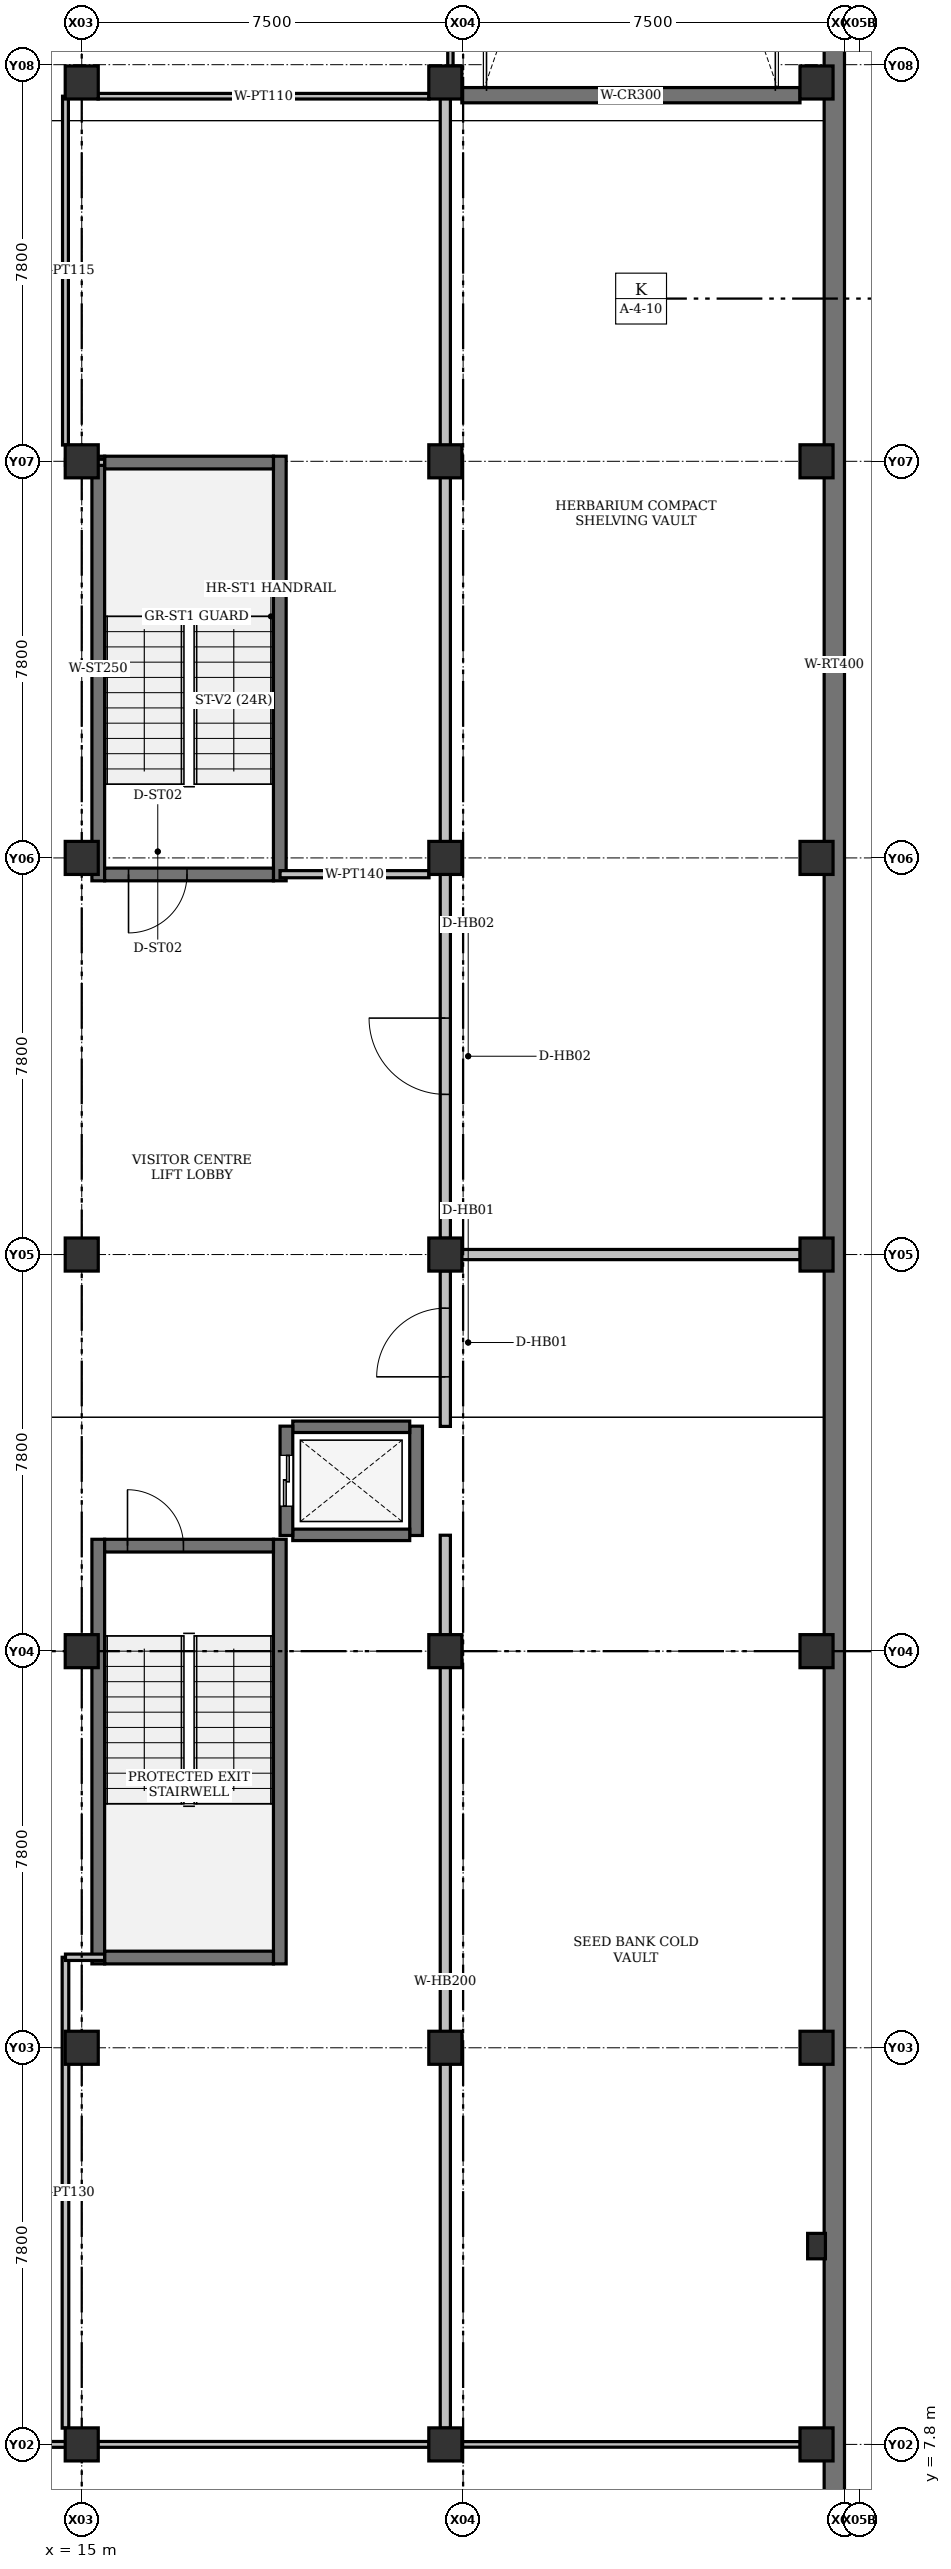
"""IFC4 building model, lengths in metres.
Left out: names, types, materials, properties, quantities, classifications, styles, units other than length and angle.
Written with IfcOpenShell. Run it as: python <this file> out.ifc"""

import sys

from ifc_helpers import new_model, si_unit, direction, frame, frame_2d, origin, origin_2d, place, context, subcontext, project, spatial, rectangle, extrude, element, fill, save


model = new_model("IFC4")
c1 = context("Model", 3, precision=1e-05, world=origin(), true_north=direction((0.0, 1.0)))
c2 = subcontext(c1, "Body", "Model", "MODEL_VIEW")
j1 = project(units=[si_unit("LENGTHUNIT", "METRE"), si_unit("PLANEANGLEUNIT", "RADIAN")], contexts=[c1])
p1 = place(None, origin())
s1 = spatial("IfcSite", under=j1, at=p1, CompositionType="ELEMENT")
p2 = place(p1, origin())
s2 = spatial("IfcBuilding", under=s1, at=p2, CompositionType="ELEMENT")
p3 = place(p2, frame((0.0, 0.0, -8.4)))
s3 = spatial("IfcBuildingStorey", under=s2, at=p3, CompositionType="ELEMENT", Elevation=-8.4)
for number, where, z_axis, x_axis in (
    (1, (15.0, 7.8, -0.3), (0.0, 0.0, 1.0), (1.0, 0.0, 0.0)),
    (2, (15.0, 15.6, -0.3), (0.0, 0.0, 1.0), (1.0, 0.0, 0.0)),
    (3, (15.0, 23.4, -0.3), (0.0, 0.0, 1.0), (1.0, 0.0, 0.0)),
    (4, (15.0, 31.2, -0.3), (0.0, 0.0, 1.0), (1.0, 0.0, 0.0)),
    (5, (15.0, 39.0, -0.3), (0.0, 0.0, 1.0), (1.0, 0.0, 0.0)),
    (6, (15.0, 46.8, -0.3), (0.0, 0.0, 1.0), (1.0, 0.0, 0.0)),
    (7, (15.0, 54.25, -0.3), (0.0, 0.0, 1.0), (1.0, 0.0, 0.0)),
    (8, (22.15, 7.8, -0.3), (0.0, 0.0, 1.0), (1.0, 0.0, 0.0)),
    (9, (22.15, 15.6, -0.3), (0.0, 0.0, 1.0), (1.0, 0.0, 0.0)),
    (10, (22.15, 23.4, -0.3), (0.0, 0.0, 1.0), (1.0, 0.0, 0.0)),
    (11, (22.15, 31.2, -0.3), (0.0, 0.0, 1.0), (1.0, 0.0, 0.0)),
    (12, (22.15, 39.0, -0.3), (0.0, 0.0, 1.0), (1.0, 0.0, 0.0)),
    (13, (22.15, 46.8, -0.3), (0.0, 0.0, 1.0), (1.0, 0.0, 0.0)),
    (14, (22.15, 54.25, -0.3), (0.0, 0.0, 1.0), (1.0, 0.0, 0.0)),
    (15, (29.45, 7.8, -0.3), (0.0, 0.0, 1.0), (1.0, 0.0, 0.0)),
    (16, (29.45, 15.6, -0.3), (0.0, 0.0, 1.0), (1.0, 0.0, 0.0)),
    (17, (29.45, 23.4, -0.3), (0.0, 0.0, 1.0), (1.0, 0.0, 0.0)),
    (18, (29.45, 31.2, -0.3), (0.0, 0.0, 1.0), (1.0, 0.0, 0.0)),
    (19, (29.45, 39.0, -0.3), (0.0, 0.0, 1.0), (1.0, 0.0, 0.0)),
    (20, (29.45, 46.8, -0.3), (0.0, 0.0, 1.0), (1.0, 0.0, 0.0)),
    (21, (29.45, 54.25, -0.3), (0.0, 0.0, 1.0), (1.0, 0.0, 0.0)),
):
    element("IfcColumn", number, at=place(p3, frame(where, z_axis=z_axis, x_axis=x_axis)), inside=s3, PredefinedType="COLUMN", context=c2, shape_type="SweptSolid", body=[
        extrude(rectangle(XDim=0.65, YDim=0.65, at=origin_2d()), origin(), (0.0, 0.0, 1.0), 4.5),
    ])
p4 = place(p3, frame((29.45, 11.7, -0.3), z_axis=(0.0, 0.0, 1.0), x_axis=(1.0, 0.0, 0.0)))
e22 = element("IfcColumn", 22, at=p4, inside=s3, PredefinedType="PILASTER", context=c2, shape_type="SweptSolid", body=[
    extrude(rectangle(XDim=0.35, YDim=0.5, at=origin_2d()), origin(), (0.0, 0.0, 1.0), 4.5),
])
p5 = place(p3, frame((29.8, 85.2, -0.3), z_axis=(0.0, 0.0, 1.0), x_axis=(0.0, -1.0, 0.0)))
e23 = element("IfcWall", 23, at=p5, inside=s3, PredefinedType="USERDEFINED", context=c2, shape_type="SweptSolid", body=[
    extrude(rectangle(XDim=84.8, YDim=0.4, at=frame_2d((42.4, 0.0))), origin(), (0.0, 0.0, 1.0), 4.26),
])
for number, where, z_axis, x_axis in (
    (24, (15.325, 17.25, -0.3), (0.0, 0.0, 1.0), (0.0, 1.0, 0.0)),
    (25, (18.895, 17.25, -0.3), (0.0, 0.0, 1.0), (0.0, 1.0, 0.0)),
):
    element("IfcWall", number, at=place(p3, frame(where, z_axis=z_axis, x_axis=x_axis)), inside=s3, PredefinedType="SHEAR", context=c2, shape_type="SweptSolid", body=[
        extrude(rectangle(XDim=8.35, YDim=0.25, at=frame_2d((4.175, 0.0))), origin(), (0.0, 0.0, 1.0), 4.5),
    ])
p6 = place(p3, frame((15.45, 17.375, -0.3), z_axis=(0.0, 0.0, 1.0), x_axis=(1.0, 0.0, 0.0)))
e26 = element("IfcWall", 26, at=p6, inside=s3, PredefinedType="SHEAR", context=c2, shape_type="SweptSolid", body=[
    extrude(rectangle(XDim=3.32, YDim=0.25, at=frame_2d((1.66, 0.0))), origin(), (0.0, 0.0, 1.0), 4.5),
])
p7 = place(p3, frame((15.45, 25.475, -0.3), z_axis=(0.0, 0.0, 1.0), x_axis=(1.0, 0.0, 0.0)))
e27 = element("IfcWall", 27, at=p7, inside=s3, PredefinedType="SHEAR", context=c2, shape_type="SweptSolid", body=[
    extrude(rectangle(XDim=3.32, YDim=0.25, at=frame_2d((1.66, 0.0))), origin(), (0.0, 0.0, 1.0), 4.5),
])
p8 = place(p7, frame((0.45, 0.0, 0.3)))
e28 = element("IfcOpeningElement", 28, at=p8, cuts=e27, PredefinedType="OPENING", context=c2, shape_type="SweptSolid", body=[
    extrude(rectangle(XDim=1.1, YDim=2.15, at=frame_2d((0.55, 1.075))), frame((0.0, 0.125, 0.0), z_axis=(0.0, -1.0, 0.0), x_axis=(1.0, 0.0, 0.0)), (0.0, 0.0, 1.0), 0.25),
])
for number, where, z_axis, x_axis in (
    (29, (15.325, 38.55, -0.3), (0.0, 0.0, 1.0), (0.0, 1.0, 0.0)),
    (30, (18.895, 38.55, -0.3), (0.0, 0.0, 1.0), (0.0, 1.0, 0.0)),
):
    element("IfcWall", number, at=place(p3, frame(where, z_axis=z_axis, x_axis=x_axis)), inside=s3, PredefinedType="SHEAR", context=c2, shape_type="SweptSolid", body=[
        extrude(rectangle(XDim=8.35, YDim=0.25, at=frame_2d((4.175, 0.0))), origin(), (0.0, 0.0, 1.0), 4.5),
    ])
p9 = place(p3, frame((15.45, 46.775, -0.3), z_axis=(0.0, 0.0, 1.0), x_axis=(1.0, 0.0, 0.0)))
e31 = element("IfcWall", 31, at=p9, inside=s3, PredefinedType="SHEAR", context=c2, shape_type="SweptSolid", body=[
    extrude(rectangle(XDim=3.32, YDim=0.25, at=frame_2d((1.66, 0.0))), origin(), (0.0, 0.0, 1.0), 4.5),
])
p10 = place(p3, frame((18.77, 38.675, -0.3), z_axis=(0.0, 0.0, 1.0), x_axis=(-1.0, 0.0, 0.0)))
e32 = element("IfcWall", 32, at=p10, inside=s3, PredefinedType="SHEAR", context=c2, shape_type="SweptSolid", body=[
    extrude(rectangle(XDim=3.32, YDim=0.25, at=frame_2d((1.66, 0.0))), origin(), (0.0, 0.0, 1.0), 4.5),
])
p11 = place(p10, frame((1.7, 0.0, 0.3)))
e33 = element("IfcOpeningElement", 33, at=p11, cuts=e32, PredefinedType="OPENING", context=c2, shape_type="SweptSolid", body=[
    extrude(rectangle(XDim=1.15, YDim=2.15, at=frame_2d((0.575, 1.075))), frame((0.0, 0.125, 0.0), z_axis=(0.0, -1.0, 0.0), x_axis=(1.0, 0.0, 0.0)), (0.0, 0.0, 1.0), 0.25),
])
p12 = place(p3, frame((21.575, 25.675, -0.3), z_axis=(0.0, 0.0, 1.0), x_axis=(0.0, 1.0, 0.0)))
e34 = element("IfcWall", 34, at=p12, inside=s3, PredefinedType="SHEAR", context=c2, shape_type="SweptSolid", body=[
    extrude(rectangle(XDim=2.15, YDim=0.25, at=frame_2d((1.075, 0.0))), origin(), (0.0, 0.0, 1.0), 4.5),
])
for number, where, z_axis, x_axis in (
    (35, (19.15, 25.688, -0.3), (0.0, 0.0, 1.0), (1.0, 0.0, 0.0)),
    (36, (19.15, 27.812, -0.3), (0.0, 0.0, 1.0), (1.0, 0.0, 0.0)),
):
    element("IfcWall", number, at=place(p3, frame(where, z_axis=z_axis, x_axis=x_axis)), inside=s3, PredefinedType="SHEAR", context=c2, shape_type="SweptSolid", body=[
        extrude(rectangle(XDim=2.3, YDim=0.225, at=frame_2d((1.15, 0.0))), origin(), (0.0, 0.0, 1.0), 4.5),
    ])
p13 = place(p3, frame((19.025, 25.675, -0.3), z_axis=(0.0, 0.0, 1.0), x_axis=(0.0, 1.0, 0.0)))
e37 = element("IfcWall", 37, at=p13, inside=s3, PredefinedType="SHEAR", context=c2, shape_type="SweptSolid", body=[
    extrude(rectangle(XDim=2.15, YDim=0.25, at=frame_2d((1.075, 0.0))), origin(), (0.0, 0.0, 1.0), 4.5),
])
p14 = place(p13, frame((0.575, 0.0, 0.3)))
e38 = element("IfcOpeningElement", 38, at=p14, cuts=e37, PredefinedType="OPENING", context=c2, shape_type="SweptSolid", body=[
    extrude(rectangle(XDim=1.0, YDim=2.1, at=frame_2d((0.5, 1.05))), frame((0.0, 0.125, 0.0), z_axis=(0.0, -1.0, 0.0), x_axis=(1.0, 0.0, 0.0)), (0.0, 0.0, 1.0), 0.25),
])
p15 = place(p3, frame((22.475, 54.0, -0.3), z_axis=(0.0, 0.0, 1.0), x_axis=(1.0, 0.0, 0.0)))
e39 = element("IfcWall", 39, at=p15, inside=s3, PredefinedType="SHEAR", context=c2, shape_type="SweptSolid", body=[
    extrude(rectangle(XDim=6.65, YDim=0.3, at=frame_2d((3.325, 0.0))), origin(), (0.0, 0.0, 1.0), 0.3),
])
p16 = place(p3, frame((22.15, 8.12, 0.0), z_axis=(0.0, 0.0, 1.0), x_axis=(0.0, 1.0, 0.0)))
e40 = element("IfcWall", 40, at=p16, inside=s3, PredefinedType="SOLIDWALL", context=c2, shape_type="SweptSolid", body=[
    extrude(rectangle(XDim=17.56, YDim=0.2, at=frame_2d((8.78, 0.0))), origin(), (0.0, 0.0, 1.0), 3.487),
])
p17 = place(p3, frame((22.15, 27.82, 0.0), z_axis=(0.0, 0.0, 1.0), x_axis=(0.0, 1.0, 0.0)))
e41 = element("IfcWall", 41, at=p17, inside=s3, PredefinedType="SOLIDWALL", context=c2, shape_type="SweptSolid", body=[
    extrude(rectangle(XDim=3.06, YDim=0.2, at=frame_2d((1.53, 0.0))), origin(), (0.0, 0.0, 1.0), 3.487),
])
p18 = place(p17, frame((0.975, 0.0, 0.0)))
e42 = element("IfcOpeningElement", 42, at=p18, cuts=e41, PredefinedType="OPENING", context=c2, shape_type="SweptSolid", body=[
    extrude(rectangle(XDim=1.35, YDim=2.25, at=frame_2d((0.675, 1.125))), frame((0.0, 0.1, 0.0), z_axis=(0.0, -1.0, 0.0), x_axis=(1.0, 0.0, 0.0)), (0.0, 0.0, 1.0), 0.2),
])
p19 = place(p3, frame((22.15, 31.52, 0.0), z_axis=(0.0, 0.0, 1.0), x_axis=(0.0, 1.0, 0.0)))
e43 = element("IfcWall", 43, at=p19, inside=s3, PredefinedType="SOLIDWALL", context=c2, shape_type="SweptSolid", body=[
    extrude(rectangle(XDim=7.16, YDim=0.2, at=frame_2d((3.58, 0.0))), origin(), (0.0, 0.0, 1.0), 3.487),
])
p20 = place(p19, frame((2.83, 0.0, 0.0)))
e44 = element("IfcOpeningElement", 44, at=p20, cuts=e43, PredefinedType="OPENING", context=c2, shape_type="SweptSolid", body=[
    extrude(rectangle(XDim=1.5, YDim=2.3, at=frame_2d((0.75, 1.15))), frame((0.0, 0.1, 0.0), z_axis=(0.0, -1.0, 0.0), x_axis=(1.0, 0.0, 0.0)), (0.0, 0.0, 1.0), 0.2),
])
p21 = place(p3, frame((22.15, 39.32, 0.0), z_axis=(0.0, 0.0, 1.0), x_axis=(0.0, 1.0, 0.0)))
e45 = element("IfcWall", 45, at=p21, inside=s3, PredefinedType="SOLIDWALL", context=c2, shape_type="SweptSolid", body=[
    extrude(rectangle(XDim=14.63, YDim=0.2, at=frame_2d((7.315, 0.0))), origin(), (0.0, 0.0, 1.0), 3.487),
])
p22 = place(p3, frame((29.13, 31.2, 0.0), z_axis=(0.0, 0.0, 1.0), x_axis=(-1.0, 0.0, 0.0)))
e46 = element("IfcWall", 46, at=p22, inside=s3, PredefinedType="SOLIDWALL", context=c2, shape_type="SweptSolid", body=[
    extrude(rectangle(XDim=6.66, YDim=0.2, at=frame_2d((3.33, 0.0))), origin(), (0.0, 0.0, 1.0), 3.411),
])
p23 = place(p3, frame((18.9, 38.68, 0.0), z_axis=(0.0, 0.0, 1.0), x_axis=(1.0, 0.0, 0.0)))
e47 = element("IfcWall", 47, at=p23, inside=s3, PredefinedType="PARTITIONING", context=c2, shape_type="SweptSolid", body=[
    extrude(rectangle(XDim=2.93, YDim=0.14, at=frame_2d((1.465, 0.0))), origin(), (0.0, 0.0, 1.0), 3.95),
])
p24 = place(p3, frame((14.68, 8.12, 0.0), z_axis=(0.0, 0.0, 1.0), x_axis=(0.0, 1.0, 0.0)))
e48 = element("IfcWall", 48, at=p24, inside=s3, PredefinedType="PARTITIONING", context=c2, shape_type="SweptSolid", body=[
    extrude(rectangle(XDim=9.26, YDim=0.13, at=frame_2d((4.63, 0.0))), origin(), (0.0, 0.0, 1.0), 3.411),
])
p25 = place(p3, frame((14.68, 17.38, 0.0), z_axis=(0.0, 0.0, 1.0), x_axis=(1.0, 0.0, 0.0)))
e49 = element("IfcWall", 49, at=p25, inside=s3, PredefinedType="PARTITIONING", context=c2, shape_type="SweptSolid", body=[
    extrude(rectangle(XDim=0.77, YDim=0.125, at=frame_2d((0.385, 0.0))), origin(), (0.0, 0.0, 1.0), 3.487),
])
p26 = place(p3, frame((14.68, 46.78, 0.0), z_axis=(0.0, 0.0, 1.0), x_axis=(1.0, 0.0, 0.0)))
e50 = element("IfcWall", 50, at=p26, inside=s3, PredefinedType="PARTITIONING", context=c2, shape_type="SweptSolid", body=[
    extrude(rectangle(XDim=0.77, YDim=0.12, at=frame_2d((0.385, 0.0))), origin(), (0.0, 0.0, 1.0), 3.411),
])
p27 = place(p3, frame((14.68, 53.98, 0.0), z_axis=(0.0, 0.0, 1.0), x_axis=(0.0, -1.0, 0.0)))
e51 = element("IfcWall", 51, at=p27, inside=s3, PredefinedType="PARTITIONING", context=c2, shape_type="SweptSolid", body=[
    extrude(rectangle(XDim=6.86, YDim=0.115, at=frame_2d((3.43, 0.0))), origin(), (0.0, 0.0, 1.0), 3.637),
])
p28 = place(p3, frame((21.83, 53.98, 0.0), z_axis=(0.0, 0.0, 1.0), x_axis=(-1.0, 0.0, 0.0)))
e52 = element("IfcWall", 52, at=p28, inside=s3, PredefinedType="PARTITIONING", context=c2, shape_type="SweptSolid", body=[
    extrude(rectangle(XDim=6.51, YDim=0.11, at=frame_2d((3.255, 0.0))), origin(), (0.0, 0.0, 1.0), 3.95),
])
p29 = place(p3, frame((22.25, 54.57, 0.0), z_axis=(0.0, 0.0, 1.0), x_axis=(0.0, 1.0, 0.0)))
e53 = element("IfcWall", 53, at=p29, inside=s3, PredefinedType="PARTITIONING", context=c2, shape_type="SweptSolid", body=[
    extrude(rectangle(XDim=21.23, YDim=0.105, at=frame_2d((10.615, 0.0))), origin(), (0.0, 0.0, 1.0), 3.95),
])
p30 = place(p3, frame((12.55, 7.8, 0.0), z_axis=(0.0, 0.0, 1.0), x_axis=(1.0, 0.0, 0.0)))
e54 = element("IfcWall", 54, at=p30, inside=s3, PredefinedType="PARTITIONING", context=c2, shape_type="SweptSolid", body=[
    extrude(rectangle(XDim=9.28, YDim=0.115, at=frame_2d((4.64, 0.0))), origin(), (0.0, 0.0, 1.0), 3.411),
])
p31 = place(p30, frame((0.325, 0.0, 0.0)))
e55 = element("IfcOpeningElement", 55, at=p31, cuts=e54, PredefinedType="OPENING", context=c2, shape_type="SweptSolid", body=[
    extrude(rectangle(XDim=1.45, YDim=2.2, at=frame_2d((0.725, 1.1))), frame((0.0, 0.058, 0.0), z_axis=(0.0, -1.0, 0.0), x_axis=(1.0, 0.0, 0.0)), (0.0, 0.0, 1.0), 0.115),
])
p32 = place(p3, frame((29.13, 7.8, 0.0), z_axis=(0.0, 0.0, 1.0), x_axis=(-1.0, 0.0, 0.0)))
e56 = element("IfcWall", 56, at=p32, inside=s3, PredefinedType="PARTITIONING", context=c2, shape_type="SweptSolid", body=[
    extrude(rectangle(XDim=6.66, YDim=0.11, at=frame_2d((3.33, 0.0))), origin(), (0.0, 0.0, 1.0), 3.411),
])
p33 = place(p8, origin())
e57 = element("IfcDoor", 57, at=p33, inside=s3, OperationType="SINGLE_SWING_LEFT", PredefinedType="DOOR", context=c2, shape_type="SweptSolid", body=[
    extrude(rectangle(XDim=1.1, YDim=2.15, at=frame_2d((0.55, 1.075))), frame((0.0, 0.025, 0.0), z_axis=(0.0, -1.0, 0.0), x_axis=(1.0, 0.0, 0.0)), (0.0, 0.0, 1.0), 0.05),
])
fill(e28, e57)
p34 = place(p11, origin())
e58 = element("IfcDoor", 58, at=p34, inside=s3, OperationType="SINGLE_SWING_RIGHT", PredefinedType="DOOR", context=c2, shape_type="SweptSolid", body=[
    extrude(rectangle(XDim=1.15, YDim=2.15, at=frame_2d((0.575, 1.075))), frame((0.0, 0.025, 0.0), z_axis=(0.0, -1.0, 0.0), x_axis=(1.0, 0.0, 0.0)), (0.0, 0.0, 1.0), 0.05),
])
fill(e33, e58)
p35 = place(p14, origin())
e59 = element("IfcDoor", 59, at=p35, inside=s3, OperationType="SLIDING_TO_LEFT", PredefinedType="DOOR", context=c2, shape_type="SweptSolid", body=[
    extrude(rectangle(XDim=1.0, YDim=2.1, at=frame_2d((0.5, 1.05))), frame((0.0, 0.025, 0.0), z_axis=(0.0, -1.0, 0.0), x_axis=(1.0, 0.0, 0.0)), (0.0, 0.0, 1.0), 0.05),
])
fill(e38, e59)
p36 = place(p18, origin())
e60 = element("IfcDoor", 60, at=p36, inside=s3, OperationType="SINGLE_SWING_LEFT", PredefinedType="DOOR", context=c2, shape_type="SweptSolid", body=[
    extrude(rectangle(XDim=1.35, YDim=2.25, at=frame_2d((0.675, 1.125))), frame((0.0, 0.025, 0.0), z_axis=(0.0, -1.0, 0.0), x_axis=(1.0, 0.0, 0.0)), (0.0, 0.0, 1.0), 0.05),
])
fill(e42, e60)
p37 = place(p20, origin())
e61 = element("IfcDoor", 61, at=p37, inside=s3, OperationType="SINGLE_SWING_RIGHT", PredefinedType="DOOR", context=c2, shape_type="SweptSolid", body=[
    extrude(rectangle(XDim=1.5, YDim=2.3, at=frame_2d((0.75, 1.15))), frame((0.0, 0.025, 0.0), z_axis=(0.0, -1.0, 0.0), x_axis=(1.0, 0.0, 0.0)), (0.0, 0.0, 1.0), 0.05),
])
fill(e44, e61)
save(model, sys.argv[1])
